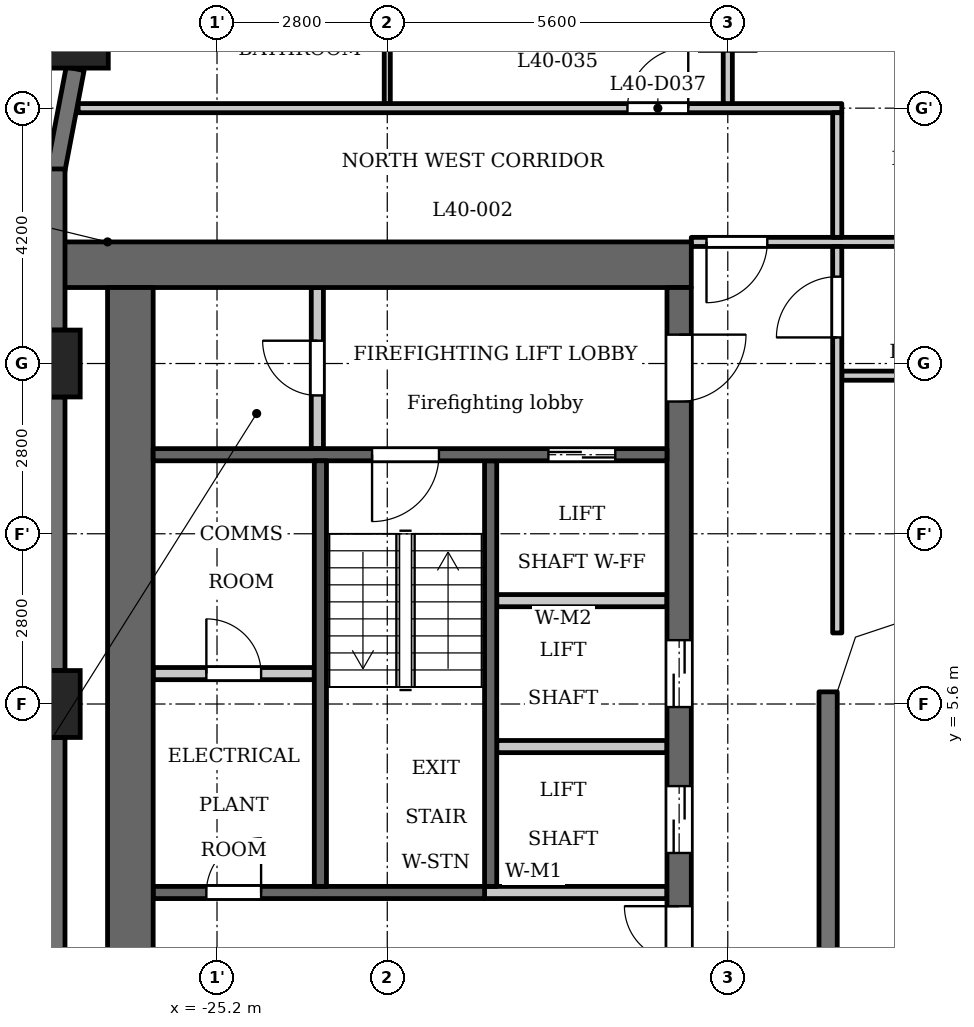
"""IFC4 building model, lengths in metres.
Left out: names, types, materials, properties, quantities, classifications, styles, units other than length and angle.
Written with IfcOpenShell. Run it as: python <this file> out.ifc"""

import sys

from ifc_helpers import new_model, si_unit, direction, frame, frame_2d, origin, origin_2d, place, context, subcontext, project, spatial, polyline, rectangle, outline, extrude, element, fill, save


model = new_model("IFC4")
c1 = context("Model", 3, precision=1e-05, world=origin(), true_north=direction((0.0, 1.0)))
c2 = subcontext(c1, "Body", "Model", "MODEL_VIEW")
j1 = project(units=[si_unit("LENGTHUNIT", "METRE"), si_unit("PLANEANGLEUNIT", "RADIAN")], contexts=[c1])
p1 = place(None, origin())
s1 = spatial("IfcSite", under=j1, at=p1, CompositionType="ELEMENT")
p2 = place(p1, origin())
s2 = spatial("IfcBuilding", under=s1, at=p2, CompositionType="ELEMENT")
p3 = place(p2, frame((0.0, 0.0, 157.1)))
s3 = spatial("IfcBuildingStorey", under=s2, at=p3, CompositionType="ELEMENT", Elevation=157.1)
for number, where, z_axis, x_axis in (
    (1, (-27.538, 16.609, 0.0), (0.0, 0.0, 1.0), (1.0, 0.0, 0.0)),
    (2, (-28.0, 11.2, 0.0), (0.0, 0.0, 1.0), (1.0, 0.0, 0.0)),
    (3, (-28.0, 5.6, 0.0), (0.0, 0.0, 1.0), (1.0, 0.0, 0.0)),
):
    element("IfcColumn", number, at=place(p3, frame(where, z_axis=z_axis, x_axis=x_axis)), inside=s3, PredefinedType="COLUMN", context=c2, shape_type="SweptSolid", body=[
        extrude(rectangle(XDim=1.1, YDim=1.1, at=origin_2d()), origin(), (0.0, 0.0, 1.0), 3.5),
    ])
p4 = place(p3, frame((-27.533, 16.048, 0.0), z_axis=(0.0, 0.0, 1.0), x_axis=(-0.187302784601, -0.982302227871, 0.0)))
e4 = element("IfcWall", 4, at=p4, inside=s3, PredefinedType="SOLIDWALL", context=c2, shape_type="SweptSolid", body=[
    extrude(rectangle(XDim=1.706, YDim=0.3, at=frame_2d((0.853, 0.0))), origin(), (0.0, 0.0, 1.0), 2.45),
])
p5 = place(p3, frame((-27.85, 14.4, 0.0), z_axis=(0.0, 0.0, 1.0), x_axis=(0.0, -1.0, 0.0)))
e5 = element("IfcWall", 5, at=p5, inside=s3, PredefinedType="SOLIDWALL", context=c2, shape_type="SweptSolid", body=[
    extrude(rectangle(XDim=2.65, YDim=0.3, at=frame_2d((1.325, 0.0))), origin(), (0.0, 0.0, 1.0), 2.45),
])
for number, where, z_axis, x_axis in (
    (6, (-27.85, 10.65, 0.0), (0.0, 0.0, 1.0), (0.0, -1.0, 0.0)),
    (7, (-27.85, 5.05, 0.0), (0.0, 0.0, 1.0), (0.0, -1.0, 0.0)),
):
    element("IfcWall", number, at=place(p3, frame(where, z_axis=z_axis, x_axis=x_axis)), inside=s3, PredefinedType="SOLIDWALL", context=c2, shape_type="SweptSolid", body=[
        extrude(rectangle(XDim=4.5, YDim=0.3, at=frame_2d((2.25, 0.0))), origin(), (0.0, 0.0, 1.0), 2.45),
    ])
p6 = place(p3, frame((-15.15, -5.8, 0.0), z_axis=(0.0, 0.0, 1.0), x_axis=(0.0, 1.0, 0.0)))
e8 = element("IfcWall", 8, at=p6, inside=s3, PredefinedType="SOLIDWALL", context=c2, shape_type="SweptSolid", body=[
    extrude(rectangle(XDim=11.6, YDim=0.3, at=frame_2d((5.8, 0.0))), origin(), (0.0, 0.0, 1.0), 3.2),
])
p7 = place(p3, frame((-20.7, 2.6, 0.0), z_axis=(0.0, 0.0, 1.0), x_axis=(0.0, 1.0, 0.0)))
e9 = element("IfcWall", 9, at=p7, inside=s3, PredefinedType="SHEAR", context=c2, shape_type="SweptSolid", body=[
    extrude(rectangle(XDim=7.0, YDim=0.2, at=frame_2d((3.5, 0.0))), origin(), (0.0, 0.0, 1.0), 3.2),
])
p8 = place(p3, frame((-20.8, 2.5, 0.0), z_axis=(0.0, 0.0, 1.0), x_axis=(-1.0, 0.0, 0.0)))
e10 = element("IfcWall", 10, at=p8, inside=s3, PredefinedType="SHEAR", context=c2, shape_type="SweptSolid", body=[
    extrude(rectangle(XDim=5.45, YDim=0.2, at=frame_2d((2.725, 0.0))), origin(), (0.0, 0.0, 1.0), 3.2),
])
p9 = place(p8, frame((3.675, 0.0, 0.0)))
e11 = element("IfcOpeningElement", 11, at=p9, cuts=e10, PredefinedType="OPENING", context=c2, shape_type="SweptSolid", body=[
    extrude(rectangle(XDim=0.9, YDim=2.1, at=frame_2d((0.45, 1.05))), frame((0.0, 0.11, 0.0), z_axis=(0.0, -1.0, 0.0), x_axis=(1.0, 0.0, 0.0)), (0.0, 0.0, 1.0), 0.22),
])
p10 = place(p3, frame((-17.4, 12.825, 0.0), z_axis=(0.0, 0.0, 1.0), x_axis=(-1.0, 0.0, 0.0)))
e12 = element("IfcWall", 12, at=p10, inside=s3, PredefinedType="SHEAR", context=c2, shape_type="SweptSolid", body=[
    extrude(rectangle(XDim=10.4, YDim=0.75, at=frame_2d((5.2, 0.0))), origin(), (0.0, 0.0, 1.0), 3.2),
])
p11 = place(p3, frame((-17.6, -12.45, 0.0), z_axis=(0.0, 0.0, 1.0), x_axis=(0.0, 1.0, 0.0)))
e13 = element("IfcWall", 13, at=p11, inside=s3, PredefinedType="SHEAR", context=c2, shape_type="SweptSolid", body=[
    extrude(rectangle(XDim=24.9, YDim=0.4, at=frame_2d((12.45, 0.0))), origin(), (0.0, 0.0, 1.0), 3.2),
])
p12 = place(p11, frame((8.65, 0.0, 0.0)))
e14 = element("IfcOpeningElement", 14, at=p12, cuts=e13, PredefinedType="OPENING", context=c2, shape_type="SweptSolid", body=[
    extrude(rectangle(XDim=0.9, YDim=2.1, at=frame_2d((0.45, 1.05))), frame((0.0, 0.21, 0.0), z_axis=(0.0, -1.0, 0.0), x_axis=(1.0, 0.0, 0.0)), (0.0, 0.0, 1.0), 0.42),
])
p13 = place(p11, frame((15.6, 0.0, 0.0)))
e15 = element("IfcOpeningElement", 15, at=p13, cuts=e13, PredefinedType="OPENING", context=c2, shape_type="SweptSolid", body=[
    extrude(rectangle(XDim=1.1, YDim=2.1, at=frame_2d((0.55, 1.05))), frame((0.0, 0.21, 0.0), z_axis=(0.0, -1.0, 0.0), x_axis=(1.0, 0.0, 0.0)), (0.0, 0.0, 1.0), 0.42),
])
p14 = place(p11, frame((18.0, 0.0, 0.0)))
e16 = element("IfcOpeningElement", 16, at=p14, cuts=e13, PredefinedType="OPENING", context=c2, shape_type="SweptSolid", body=[
    extrude(rectangle(XDim=1.1, YDim=2.1, at=frame_2d((0.55, 1.05))), frame((0.0, 0.21, 0.0), z_axis=(0.0, -1.0, 0.0), x_axis=(1.0, 0.0, 0.0)), (0.0, 0.0, 1.0), 0.42),
])
p15 = place(p11, frame((23.025, 0.0, 0.0)))
e17 = element("IfcOpeningElement", 17, at=p15, cuts=e13, PredefinedType="OPENING", context=c2, shape_type="SweptSolid", body=[
    extrude(rectangle(XDim=1.1, YDim=2.1, at=frame_2d((0.55, 1.05))), frame((0.0, 0.21, 0.0), z_axis=(0.0, -1.0, 0.0), x_axis=(1.0, 0.0, 0.0)), (0.0, 0.0, 1.0), 0.42),
])
p16 = place(p11, frame((0.775, 0.0, 0.0)))
e18 = element("IfcOpeningElement", 18, at=p16, cuts=e13, PredefinedType="OPENING", context=c2, shape_type="SweptSolid", body=[
    extrude(rectangle(XDim=1.1, YDim=2.1, at=frame_2d((0.55, 1.05))), frame((0.0, 0.21, 0.0), z_axis=(0.0, -1.0, 0.0), x_axis=(1.0, 0.0, 0.0)), (0.0, 0.0, 1.0), 0.42),
])
p17 = place(p11, frame((12.925, 0.0, 0.0)))
e19 = element("IfcOpeningElement", 19, at=p17, cuts=e13, PredefinedType="OPENING", context=c2, shape_type="SweptSolid", body=[
    extrude(rectangle(XDim=1.8, YDim=2.1, at=frame_2d((0.9, 1.05))), frame((0.0, 0.21, 0.0), z_axis=(0.0, -1.0, 0.0), x_axis=(1.0, 0.0, 0.0)), (0.0, 0.0, 1.0), 0.42),
])
p18 = place(p3, frame((-26.625, -12.45, 0.0), z_axis=(0.0, 0.0, 1.0), x_axis=(0.0, 1.0, 0.0)))
e20 = element("IfcWall", 20, at=p18, inside=s3, PredefinedType="SHEAR", context=c2, shape_type="SweptSolid", body=[
    extrude(rectangle(XDim=24.9, YDim=0.75, at=frame_2d((12.45, 0.0))), origin(), (0.0, 0.0, 1.0), 3.2),
])
p19 = place(p3, frame((-23.55, 9.8, 0.0), z_axis=(0.0, 0.0, 1.0), x_axis=(0.0, 1.0, 0.0)))
e21 = element("IfcWall", 21, at=p19, inside=s3, PredefinedType="PARTITIONING", context=c2, shape_type="SweptSolid", body=[
    extrude(rectangle(XDim=2.65, YDim=0.2, at=frame_2d((1.325, 0.0))), origin(), (0.0, 0.0, 1.0), 3.2),
])
p20 = place(p19, frame((0.875, 0.0, 0.0)))
e22 = element("IfcOpeningElement", 22, at=p20, cuts=e21, PredefinedType="OPENING", context=c2, shape_type="SweptSolid", body=[
    extrude(rectangle(XDim=0.9, YDim=2.1, at=frame_2d((0.45, 1.05))), frame((0.0, 0.11, 0.0), z_axis=(0.0, -1.0, 0.0), x_axis=(1.0, 0.0, 0.0)), (0.0, 0.0, 1.0), 0.22),
])
p21 = place(p3, frame((-23.6, 6.1, 0.0), z_axis=(0.0, 0.0, 1.0), x_axis=(-1.0, 0.0, 0.0)))
e23 = element("IfcWall", 23, at=p21, inside=s3, PredefinedType="PARTITIONING", context=c2, shape_type="SweptSolid", body=[
    extrude(rectangle(XDim=2.65, YDim=0.2, at=frame_2d((1.325, 0.0))), origin(), (0.0, 0.0, 1.0), 3.2),
])
p22 = place(p21, frame((0.875, 0.0, 0.0)))
e24 = element("IfcOpeningElement", 24, at=p22, cuts=e23, PredefinedType="OPENING", context=c2, shape_type="SweptSolid", body=[
    extrude(rectangle(XDim=0.9, YDim=2.1, at=frame_2d((0.45, 1.05))), frame((0.0, 0.11, 0.0), z_axis=(0.0, -1.0, 0.0), x_axis=(1.0, 0.0, 0.0)), (0.0, 0.0, 1.0), 0.22),
])
p23 = place(p3, frame((-17.8, 2.5, 0.0), z_axis=(0.0, 0.0, 1.0), x_axis=(-1.0, 0.0, 0.0)))
e25 = element("IfcWall", 25, at=p23, inside=s3, PredefinedType="PARTITIONING", context=c2, shape_type="SweptSolid", body=[
    extrude(rectangle(XDim=3.0, YDim=0.2, at=frame_2d((1.5, 0.0))), origin(), (0.0, 0.0, 1.0), 3.2),
])
for number, where, z_axis, x_axis in (
    (26, (-17.8, 4.9, 0.0), (0.0, 0.0, 1.0), (-1.0, 0.0, 0.0)),
    (27, (-17.8, 7.3, 0.0), (0.0, 0.0, 1.0), (-1.0, 0.0, 0.0)),
):
    element("IfcWall", number, at=place(p3, frame(where, z_axis=z_axis, x_axis=x_axis)), inside=s3, PredefinedType="PARTITIONING", context=c2, shape_type="SweptSolid", body=[
        extrude(rectangle(XDim=2.8, YDim=0.2, at=frame_2d((1.4, 0.0))), origin(), (0.0, 0.0, 1.0), 3.2),
    ])
p24 = place(p3, frame((-17.8, 9.7, 0.0), z_axis=(0.0, 0.0, 1.0), x_axis=(-1.0, 0.0, 0.0)))
e28 = element("IfcWall", 28, at=p24, inside=s3, PredefinedType="SHEAR", context=c2, shape_type="SweptSolid", body=[
    extrude(rectangle(XDim=8.45, YDim=0.2, at=frame_2d((4.225, 0.0))), origin(), (0.0, 0.0, 1.0), 3.2),
])
p25 = place(p24, frame((0.85, 0.0, 0.0)))
e29 = element("IfcOpeningElement", 29, at=p25, cuts=e28, PredefinedType="OPENING", context=c2, shape_type="SweptSolid", body=[
    extrude(rectangle(XDim=1.1, YDim=2.1, at=frame_2d((0.55, 1.05))), frame((0.0, 0.11, 0.0), z_axis=(0.0, -1.0, 0.0), x_axis=(1.0, 0.0, 0.0)), (0.0, 0.0, 1.0), 0.22),
])
p26 = place(p24, frame((3.75, 0.0, 0.0)))
e30 = element("IfcOpeningElement", 30, at=p26, cuts=e28, PredefinedType="OPENING", context=c2, shape_type="SweptSolid", body=[
    extrude(rectangle(XDim=1.1, YDim=2.1, at=frame_2d((0.55, 1.05))), frame((0.0, 0.11, 0.0), z_axis=(0.0, -1.0, 0.0), x_axis=(1.0, 0.0, 0.0)), (0.0, 0.0, 1.0), 0.22),
])
p27 = place(p3, frame((-23.5, 2.6, 0.0), z_axis=(0.0, 0.0, 1.0), x_axis=(0.0, 1.0, 0.0)))
e31 = element("IfcWall", 31, at=p27, inside=s3, PredefinedType="SHEAR", context=c2, shape_type="SweptSolid", body=[
    extrude(rectangle(XDim=7.0, YDim=0.2, at=frame_2d((3.5, 0.0))), origin(), (0.0, 0.0, 1.0), 3.2),
])
p28 = place(p3, frame((-14.925, 11.0, 0.0), z_axis=(0.0, 0.0, 1.0), x_axis=(1.0, 0.0, 0.0)))
e32 = element("IfcWall", 32, at=p28, inside=s3, PredefinedType="PARTITIONING", context=c2, shape_type="SweptSolid", body=[
    extrude(rectangle(XDim=29.85, YDim=0.15, at=frame_2d((14.925, 0.0))), origin(), (0.0, 0.0, 1.0), 3.2),
])
p29 = place(p28, frame((1.076, 0.0, 0.0)))
e33 = element("IfcOpeningElement", 33, at=p29, cuts=e32, PredefinedType="OPENING", context=c2, shape_type="SweptSolid", body=[
    extrude(rectangle(XDim=1.0, YDim=2.1, at=frame_2d((0.5, 1.05))), frame((0.0, 0.085, 0.0), z_axis=(0.0, -1.0, 0.0), x_axis=(1.0, 0.0, 0.0)), (0.0, 0.0, 1.0), 0.17),
])
p30 = place(p28, frame((7.625, 0.0, 0.0)))
e34 = element("IfcOpeningElement", 34, at=p30, cuts=e32, PredefinedType="OPENING", context=c2, shape_type="SweptSolid", body=[
    extrude(rectangle(XDim=1.0, YDim=2.1, at=frame_2d((0.5, 1.05))), frame((0.0, 0.085, 0.0), z_axis=(0.0, -1.0, 0.0), x_axis=(1.0, 0.0, 0.0)), (0.0, 0.0, 1.0), 0.17),
])
p31 = place(p28, frame((9.975, 0.0, 0.0)))
e35 = element("IfcOpeningElement", 35, at=p31, cuts=e32, PredefinedType="OPENING", context=c2, shape_type="SweptSolid", body=[
    extrude(rectangle(XDim=1.0, YDim=2.1, at=frame_2d((0.5, 1.05))), frame((0.0, 0.085, 0.0), z_axis=(0.0, -1.0, 0.0), x_axis=(1.0, 0.0, 0.0)), (0.0, 0.0, 1.0), 0.17),
])
p32 = place(p28, frame((18.825, 0.0, 0.0)))
e36 = element("IfcOpeningElement", 36, at=p32, cuts=e32, PredefinedType="OPENING", context=c2, shape_type="SweptSolid", body=[
    extrude(rectangle(XDim=1.0, YDim=2.1, at=frame_2d((0.5, 1.05))), frame((0.0, 0.085, 0.0), z_axis=(0.0, -1.0, 0.0), x_axis=(1.0, 0.0, 0.0)), (0.0, 0.0, 1.0), 0.17),
])
p33 = place(p28, frame((21.175, 0.0, 0.0)))
e37 = element("IfcOpeningElement", 37, at=p33, cuts=e32, PredefinedType="OPENING", context=c2, shape_type="SweptSolid", body=[
    extrude(rectangle(XDim=1.0, YDim=2.1, at=frame_2d((0.5, 1.05))), frame((0.0, 0.085, 0.0), z_axis=(0.0, -1.0, 0.0), x_axis=(1.0, 0.0, 0.0)), (0.0, 0.0, 1.0), 0.17),
])
p34 = place(p28, frame((27.775, 0.0, 0.0)))
e38 = element("IfcOpeningElement", 38, at=p34, cuts=e32, PredefinedType="OPENING", context=c2, shape_type="SweptSolid", body=[
    extrude(rectangle(XDim=1.0, YDim=2.1, at=frame_2d((0.5, 1.05))), frame((0.0, 0.085, 0.0), z_axis=(0.0, -1.0, 0.0), x_axis=(1.0, 0.0, 0.0)), (0.0, 0.0, 1.0), 0.17),
])
p35 = place(p3, frame((-17.4, 13.2, 0.0), z_axis=(0.0, 0.0, 1.0), x_axis=(1.0, 0.0, 0.0)))
e39 = element("IfcWall", 39, at=p35, inside=s3, PredefinedType="PARTITIONING", context=c2, shape_type="SweptSolid", body=[
    extrude(rectangle(XDim=34.8, YDim=0.15, at=frame_2d((17.4, 0.0))), origin(), (0.0, 0.0, 1.0), 3.2),
])
p36 = place(p35, frame((0.25, 0.0, 0.0)))
e40 = element("IfcOpeningElement", 40, at=p36, cuts=e39, PredefinedType="OPENING", context=c2, shape_type="SweptSolid", body=[
    extrude(rectangle(XDim=1.0, YDim=2.1, at=frame_2d((0.5, 1.05))), frame((0.0, 0.085, 0.0), z_axis=(0.0, -1.0, 0.0), x_axis=(1.0, 0.0, 0.0)), (0.0, 0.0, 1.0), 0.17),
])
p37 = place(p35, frame((33.65, 0.0, 0.0)))
e41 = element("IfcOpeningElement", 41, at=p37, cuts=e39, PredefinedType="OPENING", context=c2, shape_type="SweptSolid", body=[
    extrude(rectangle(XDim=1.0, YDim=2.1, at=frame_2d((0.5, 1.05))), frame((0.0, 0.085, 0.0), z_axis=(0.0, -1.0, 0.0), x_axis=(1.0, 0.0, 0.0)), (0.0, 0.0, 1.0), 0.17),
])
p38 = place(p35, frame((15.75, 0.0, 0.0)))
e42 = element("IfcOpeningElement", 42, at=p38, cuts=e39, PredefinedType="OPENING", context=c2, shape_type="SweptSolid", body=[
    extrude(rectangle(XDim=1.0, YDim=2.1, at=frame_2d((0.5, 1.05))), frame((0.0, 0.085, 0.0), z_axis=(0.0, -1.0, 0.0), x_axis=(1.0, 0.0, 0.0)), (0.0, 0.0, 1.0), 0.17),
])
p39 = place(p35, frame((20.85, 0.0, 0.0)))
e43 = element("IfcOpeningElement", 43, at=p39, cuts=e39, PredefinedType="OPENING", context=c2, shape_type="SweptSolid", body=[
    extrude(rectangle(XDim=1.0, YDim=2.1, at=frame_2d((0.5, 1.05))), frame((0.0, 0.085, 0.0), z_axis=(0.0, -1.0, 0.0), x_axis=(1.0, 0.0, 0.0)), (0.0, 0.0, 1.0), 0.17),
])
p40 = place(p35, frame((23.55, 0.0, 0.0)))
e44 = element("IfcOpeningElement", 44, at=p40, cuts=e39, PredefinedType="OPENING", context=c2, shape_type="SweptSolid", body=[
    extrude(rectangle(XDim=1.0, YDim=2.1, at=frame_2d((0.5, 1.05))), frame((0.0, 0.085, 0.0), z_axis=(0.0, -1.0, 0.0), x_axis=(1.0, 0.0, 0.0)), (0.0, 0.0, 1.0), 0.17),
])
p41 = place(p3, frame((-27.484, 15.4, 0.0), z_axis=(0.0, 0.0, 1.0), x_axis=(1.0, 0.0, 0.0)))
e45 = element("IfcWall", 45, at=p41, inside=s3, PredefinedType="PARTITIONING", context=c2, shape_type="SweptSolid", body=[
    extrude(rectangle(XDim=12.559, YDim=0.15, at=frame_2d((6.279, 0.0))), origin(), (0.0, 0.0, 1.0), 3.2),
])
p42 = place(p41, frame((9.034, 0.0, 0.0)))
e46 = element("IfcOpeningElement", 46, at=p42, cuts=e45, PredefinedType="OPENING", context=c2, shape_type="SweptSolid", body=[
    extrude(rectangle(XDim=1.0, YDim=2.1, at=frame_2d((0.5, 1.05))), frame((0.0, 0.085, 0.0), z_axis=(0.0, -1.0, 0.0), x_axis=(1.0, 0.0, 0.0)), (0.0, 0.0, 1.0), 0.17),
])
p43 = place(p3, frame((-22.4, 15.475, 0.0), z_axis=(0.0, 0.0, 1.0), x_axis=(0.0, 1.0, 0.0)))
e47 = element("IfcWall", 47, at=p43, inside=s3, PredefinedType="PARTITIONING", context=c2, shape_type="SweptSolid", body=[
    extrude(rectangle(XDim=2.575, YDim=0.1, at=frame_2d((1.288, 0.0))), origin(), (0.0, 0.0, 1.0), 3.2),
])
p44 = place(p3, frame((-16.8, 15.475, 0.0), z_axis=(0.0, 0.0, 1.0), x_axis=(0.0, 1.0, 0.0)))
e48 = element("IfcWall", 48, at=p44, inside=s3, PredefinedType="PARTITIONING", context=c2, shape_type="SweptSolid", body=[
    extrude(rectangle(XDim=7.455, YDim=0.15, at=frame_2d((3.728, 0.0))), origin(), (0.0, 0.0, 1.0), 3.2),
])
p45 = place(p3, frame((-15.0, 6.769, 0.0), z_axis=(0.0, 0.0, 1.0), x_axis=(0.0, 1.0, 0.0)))
e49 = element("IfcWall", 49, at=p45, inside=s3, PredefinedType="PARTITIONING", context=c2, shape_type="SweptSolid", body=[
    extrude(rectangle(XDim=6.356, YDim=0.15, at=frame_2d((3.178, 0.0))), origin(), (0.0, 0.0, 1.0), 3.2),
])
p46 = place(p45, frame((4.86, 0.0, 0.0)))
e50 = element("IfcOpeningElement", 50, at=p46, cuts=e49, PredefinedType="OPENING", context=c2, shape_type="SweptSolid", body=[
    extrude(rectangle(XDim=1.0, YDim=2.1, at=frame_2d((0.5, 1.05))), frame((0.0, 0.085, 0.0), z_axis=(0.0, -1.0, 0.0), x_axis=(1.0, 0.0, 0.0)), (0.0, 0.0, 1.0), 0.17),
])
p47 = place(p3, frame((-15.0, 13.275, 0.0), z_axis=(0.0, 0.0, 1.0), x_axis=(0.0, 1.0, 0.0)))
e51 = element("IfcWall", 51, at=p47, inside=s3, PredefinedType="PARTITIONING", context=c2, shape_type="SweptSolid", body=[
    extrude(rectangle(XDim=2.05, YDim=0.15, at=frame_2d((1.025, 0.0))), origin(), (0.0, 0.0, 1.0), 3.2),
])
p48 = place(p3, origin())
e52 = element("IfcWall", 52, at=p48, inside=s3, PredefinedType="SOLIDWALL", context=c2, shape_type="SweptSolid", body=[
    extrude(outline(polyline([(-13.849, 7.3), (-14.937, 6.937), (-15.3, 5.849), (-15.3, 5.8), (-15.0, 5.8), (-14.7, 6.7), (-13.8, 7.0), (-13.8, 7.3), (-13.849, 7.3)])), origin(), (0.0, 0.0, 1.0), 3.2),
])
p49 = place(p13, origin())
e53 = element("IfcDoor", 53, at=p49, inside=s3, OperationType="DOUBLE_DOOR_SLIDING", PredefinedType="DOOR", context=c2, shape_type="SweptSolid", body=[
    extrude(rectangle(XDim=1.1, YDim=2.1, at=frame_2d((0.55, 1.05))), frame((0.0, 0.025, 0.0), z_axis=(0.0, -1.0, 0.0), x_axis=(1.0, 0.0, 0.0)), (0.0, 0.0, 1.0), 0.05),
])
fill(e15, e53)
p50 = place(p14, origin())
e54 = element("IfcDoor", 54, at=p50, inside=s3, OperationType="DOUBLE_DOOR_SLIDING", PredefinedType="DOOR", context=c2, shape_type="SweptSolid", body=[
    extrude(rectangle(XDim=1.1, YDim=2.1, at=frame_2d((0.55, 1.05))), frame((0.0, 0.025, 0.0), z_axis=(0.0, -1.0, 0.0), x_axis=(1.0, 0.0, 0.0)), (0.0, 0.0, 1.0), 0.05),
])
fill(e16, e54)
p51 = place(p25, origin())
e55 = element("IfcDoor", 55, at=p51, inside=s3, OperationType="DOUBLE_DOOR_SLIDING", PredefinedType="DOOR", context=c2, shape_type="SweptSolid", body=[
    extrude(rectangle(XDim=1.1, YDim=2.1, at=frame_2d((0.55, 1.05))), frame((0.0, 0.025, 0.0), z_axis=(0.0, -1.0, 0.0), x_axis=(1.0, 0.0, 0.0)), (0.0, 0.0, 1.0), 0.05),
])
fill(e29, e55)
p52 = place(p15, origin())
e56 = element("IfcDoor", 56, at=p52, inside=s3, OperationType="SINGLE_SWING_RIGHT", PredefinedType="DOOR", context=c2, shape_type="SweptSolid", body=[
    extrude(rectangle(XDim=1.1, YDim=2.1, at=frame_2d((0.55, 1.05))), frame((0.0, 0.025, 0.0), z_axis=(0.0, -1.0, 0.0), x_axis=(1.0, 0.0, 0.0)), (0.0, 0.0, 1.0), 0.05),
])
fill(e17, e56)
p53 = place(p20, origin())
e57 = element("IfcDoor", 57, at=p53, inside=s3, OperationType="SINGLE_SWING_LEFT", PredefinedType="DOOR", context=c2, shape_type="SweptSolid", body=[
    extrude(rectangle(XDim=0.9, YDim=2.1, at=frame_2d((0.45, 1.05))), frame((0.0, 0.025, 0.0), z_axis=(0.0, -1.0, 0.0), x_axis=(1.0, 0.0, 0.0)), (0.0, 0.0, 1.0), 0.05),
])
fill(e22, e57)
p54 = place(p26, origin())
e58 = element("IfcDoor", 58, at=p54, inside=s3, OperationType="SINGLE_SWING_LEFT", PredefinedType="DOOR", context=c2, shape_type="SweptSolid", body=[
    extrude(rectangle(XDim=1.1, YDim=2.1, at=frame_2d((0.55, 1.05))), frame((0.0, 0.025, 0.0), z_axis=(0.0, -1.0, 0.0), x_axis=(1.0, 0.0, 0.0)), (0.0, 0.0, 1.0), 0.05),
])
fill(e30, e58)
p55 = place(p17, origin())
e59 = element("IfcDoor", 59, at=p55, inside=s3, OperationType="DOUBLE_DOOR_SINGLE_SWING", PredefinedType="DOOR", context=c2, shape_type="SweptSolid", body=[
    extrude(rectangle(XDim=1.8, YDim=2.1, at=frame_2d((0.9, 1.05))), frame((0.0, 0.025, 0.0), z_axis=(0.0, -1.0, 0.0), x_axis=(1.0, 0.0, 0.0)), (0.0, 0.0, 1.0), 0.05),
])
fill(e19, e59)
p56 = place(p22, origin())
e60 = element("IfcDoor", 60, at=p56, inside=s3, OperationType="SINGLE_SWING_RIGHT", PredefinedType="DOOR", context=c2, shape_type="SweptSolid", body=[
    extrude(rectangle(XDim=0.9, YDim=2.1, at=frame_2d((0.45, 1.05))), frame((0.0, 0.025, 0.0), z_axis=(0.0, -1.0, 0.0), x_axis=(1.0, 0.0, 0.0)), (0.0, 0.0, 1.0), 0.05),
])
fill(e24, e60)
p57 = place(p9, origin())
e61 = element("IfcDoor", 61, at=p57, inside=s3, OperationType="SINGLE_SWING_LEFT", PredefinedType="DOOR", context=c2, shape_type="SweptSolid", body=[
    extrude(rectangle(XDim=0.9, YDim=2.1, at=frame_2d((0.45, 1.05))), frame((0.0, 0.025, 0.0), z_axis=(0.0, -1.0, 0.0), x_axis=(1.0, 0.0, 0.0)), (0.0, 0.0, 1.0), 0.05),
])
fill(e11, e61)
p58 = place(p46, origin())
e62 = element("IfcDoor", 62, at=p58, inside=s3, OperationType="SINGLE_SWING_RIGHT", PredefinedType="DOOR", context=c2, shape_type="SweptSolid", body=[
    extrude(rectangle(XDim=1.0, YDim=2.1, at=frame_2d((0.5, 1.05))), frame((0.0, 0.025, 0.0), z_axis=(0.0, -1.0, 0.0), x_axis=(1.0, 0.0, 0.0)), (0.0, 0.0, 1.0), 0.05),
])
fill(e50, e62)
p59 = place(p36, origin())
e63 = element("IfcDoor", 63, at=p59, inside=s3, OperationType="SINGLE_SWING_LEFT", PredefinedType="DOOR", context=c2, shape_type="SweptSolid", body=[
    extrude(rectangle(XDim=1.0, YDim=2.1, at=frame_2d((0.5, 1.05))), frame((0.0, 0.025, 0.0), z_axis=(0.0, -1.0, 0.0), x_axis=(1.0, 0.0, 0.0)), (0.0, 0.0, 1.0), 0.05),
])
fill(e40, e63)
p60 = place(p42, origin())
e64 = element("IfcDoor", 64, at=p60, inside=s3, OperationType="SINGLE_SWING_LEFT", PredefinedType="DOOR", context=c2, shape_type="SweptSolid", body=[
    extrude(rectangle(XDim=1.0, YDim=2.1, at=frame_2d((0.5, 1.05))), frame((0.0, 0.025, 0.0), z_axis=(0.0, -1.0, 0.0), x_axis=(1.0, 0.0, 0.0)), (0.0, 0.0, 1.0), 0.05),
])
fill(e46, e64)
save(model, sys.argv[1])
